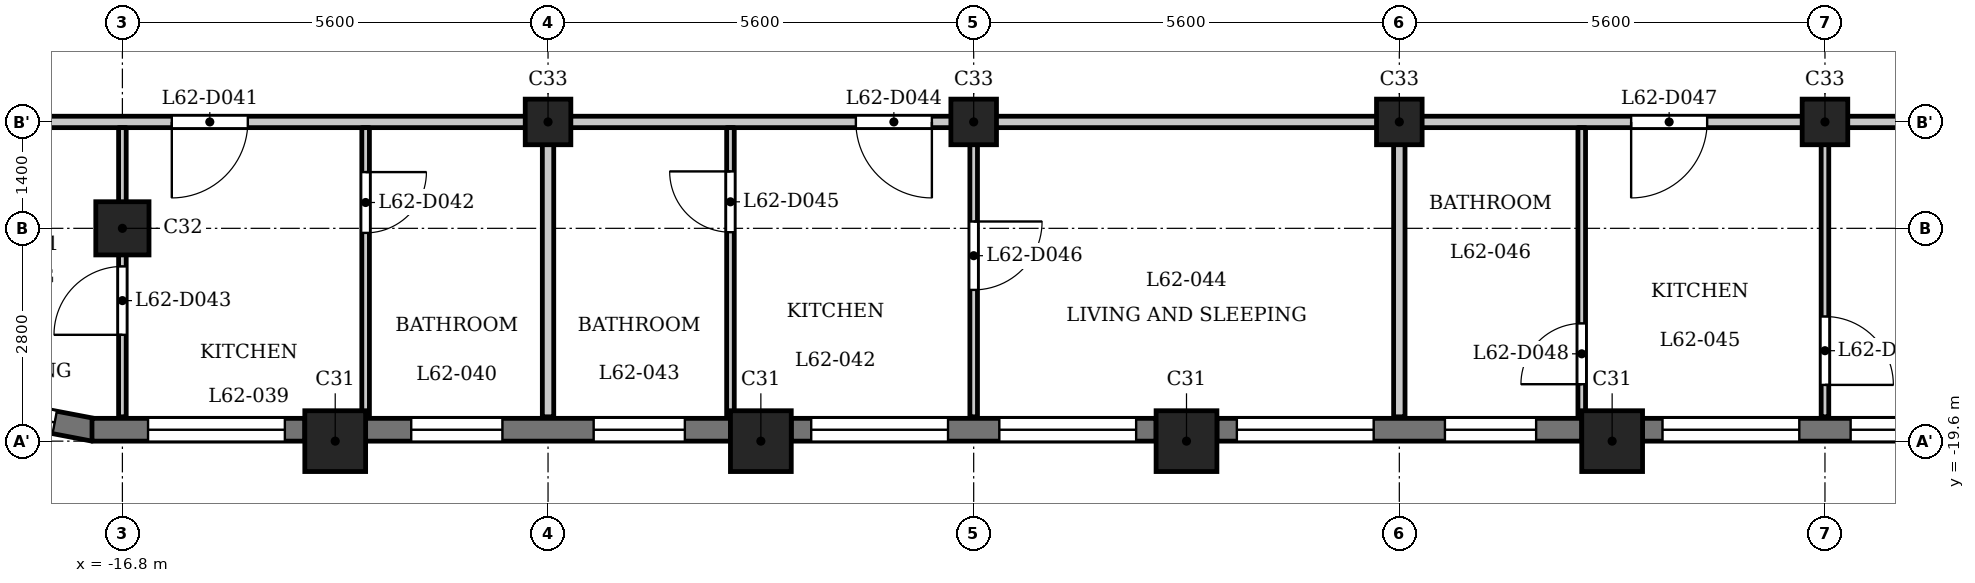
"""IFC4 building model, lengths in metres.
Left out: names, types, materials, properties, quantities, classifications, styles, units other than length and angle.
Written with IfcOpenShell. Run it as: python <this file> out.ifc"""

import sys

from ifc_helpers import new_model, si_unit, direction, frame, frame_2d, origin, origin_2d, place, context, subcontext, project, spatial, rectangle, extrude, element, fill, save


model = new_model("IFC4")
c1 = context("Model", 3, precision=1e-05, world=origin(), true_north=direction((0.0, 1.0)))
c2 = subcontext(c1, "Body", "Model", "MODEL_VIEW")
j1 = project(units=[si_unit("LENGTHUNIT", "METRE"), si_unit("PLANEANGLEUNIT", "RADIAN")], contexts=[c1])
p1 = place(None, origin())
s1 = spatial("IfcSite", under=j1, at=p1, CompositionType="ELEMENT")
p2 = place(p1, origin())
s2 = spatial("IfcBuilding", under=s1, at=p2, CompositionType="ELEMENT")
p3 = place(p2, frame((0.0, 0.0, 241.7)))
s3 = spatial("IfcBuildingStorey", under=s2, at=p3, CompositionType="ELEMENT", Elevation=241.7)
for number, where, z_axis, x_axis in (
    (1, (-14.0, -19.6, 0.0), (0.0, 0.0, 1.0), (1.0, 0.0, 0.0)),
    (2, (-8.4, -19.6, 0.0), (0.0, 0.0, 1.0), (1.0, 0.0, 0.0)),
    (3, (-2.8, -19.6, 0.0), (0.0, 0.0, 1.0), (1.0, 0.0, 0.0)),
    (4, (2.8, -19.6, 0.0), (0.0, 0.0, 1.0), (1.0, 0.0, 0.0)),
):
    element("IfcColumn", number, at=place(p3, frame(where, z_axis=z_axis, x_axis=x_axis)), inside=s3, PredefinedType="COLUMN", context=c2, shape_type="SweptSolid", body=[
        extrude(rectangle(XDim=0.8, YDim=0.8, at=origin_2d()), origin(), (0.0, 0.0, 1.0), 3.5),
    ])
p4 = place(p3, frame((-16.8, -16.8, 0.0), z_axis=(0.0, 0.0, 1.0), x_axis=(1.0, 0.0, 0.0)))
e5 = element("IfcColumn", 5, at=p4, inside=s3, PredefinedType="COLUMN", context=c2, shape_type="SweptSolid", body=[
    extrude(rectangle(XDim=0.7, YDim=0.7, at=origin_2d()), origin(), (0.0, 0.0, 1.0), 3.5),
])
for number, where, z_axis, x_axis in (
    (6, (-11.2, -15.4, 0.0), (0.0, 0.0, 1.0), (1.0, 0.0, 0.0)),
    (7, (-5.6, -15.4, 0.0), (0.0, 0.0, 1.0), (1.0, 0.0, 0.0)),
    (8, (0.0, -15.4, 0.0), (0.0, 0.0, 1.0), (1.0, 0.0, 0.0)),
    (9, (5.6, -15.4, 0.0), (0.0, 0.0, 1.0), (1.0, 0.0, 0.0)),
):
    element("IfcColumn", number, at=place(p3, frame(where, z_axis=z_axis, x_axis=x_axis)), inside=s3, PredefinedType="COLUMN", context=c2, shape_type="SweptSolid", body=[
        extrude(rectangle(XDim=0.6, YDim=0.6, at=origin_2d()), origin(), (0.0, 0.0, 1.0), 3.5),
    ])
p5 = place(p3, frame((-18.995, -19.105, 0.0), z_axis=(0.0, 0.0, 1.0), x_axis=(0.982301706131, -0.187305520826, 0.0)))
e10 = element("IfcWall", 10, at=p5, inside=s3, PredefinedType="SOLIDWALL", context=c2, shape_type="SweptSolid", body=[
    extrude(rectangle(XDim=1.856, YDim=0.3, at=frame_2d((0.928, 0.0))), origin(), (0.0, 0.0, 1.0), 2.55),
])
p6 = place(p5, frame((0.528, 0.0, 0.6)))
e11 = element("IfcOpeningElement", 11, at=p6, cuts=e10, PredefinedType="OPENING", context=c2, shape_type="SweptSolid", body=[
    extrude(rectangle(XDim=0.8, YDim=1.55, at=frame_2d((0.4, 0.775))), frame((0.0, 0.16, 0.0), z_axis=(0.0, -1.0, 0.0), x_axis=(1.0, 0.0, 0.0)), (0.0, 0.0, 1.0), 0.32),
])
p7 = place(p3, frame((-17.2, -19.45, 0.0), z_axis=(0.0, 0.0, 1.0), x_axis=(1.0, 0.0, 0.0)))
e12 = element("IfcWall", 12, at=p7, inside=s3, PredefinedType="SOLIDWALL", context=c2, shape_type="SweptSolid", body=[
    extrude(rectangle(XDim=2.8, YDim=0.3, at=frame_2d((1.4, 0.0))), origin(), (0.0, 0.0, 1.0), 2.55),
])
p8 = place(p7, frame((0.738, 0.0, 0.9)))
e13 = element("IfcOpeningElement", 13, at=p8, cuts=e12, PredefinedType="OPENING", context=c2, shape_type="SweptSolid", body=[
    extrude(rectangle(XDim=1.8, YDim=1.25, at=frame_2d((0.9, 0.625))), frame((0.0, 0.16, 0.0), z_axis=(0.0, -1.0, 0.0), x_axis=(1.0, 0.0, 0.0)), (0.0, 0.0, 1.0), 0.32),
])
p9 = place(p3, frame((-13.6, -19.45, 0.0), z_axis=(0.0, 0.0, 1.0), x_axis=(1.0, 0.0, 0.0)))
e14 = element("IfcWall", 14, at=p9, inside=s3, PredefinedType="SOLIDWALL", context=c2, shape_type="SweptSolid", body=[
    extrude(rectangle(XDim=4.8, YDim=0.3, at=frame_2d((2.4, 0.0))), origin(), (0.0, 0.0, 1.0), 2.55),
])
p10 = place(p9, frame((0.6, 0.0, 0.6)))
e15 = element("IfcOpeningElement", 15, at=p10, cuts=e14, PredefinedType="OPENING", context=c2, shape_type="SweptSolid", body=[
    extrude(rectangle(XDim=1.2, YDim=1.55, at=frame_2d((0.6, 0.775))), frame((0.0, 0.16, 0.0), z_axis=(0.0, -1.0, 0.0), x_axis=(1.0, 0.0, 0.0)), (0.0, 0.0, 1.0), 0.32),
])
p11 = place(p9, frame((3.0, 0.0, 0.6)))
e16 = element("IfcOpeningElement", 16, at=p11, cuts=e14, PredefinedType="OPENING", context=c2, shape_type="SweptSolid", body=[
    extrude(rectangle(XDim=1.2, YDim=1.55, at=frame_2d((0.6, 0.775))), frame((0.0, 0.16, 0.0), z_axis=(0.0, -1.0, 0.0), x_axis=(1.0, 0.0, 0.0)), (0.0, 0.0, 1.0), 0.32),
])
p12 = place(p3, frame((-8.0, -19.45, 0.0), z_axis=(0.0, 0.0, 1.0), x_axis=(1.0, 0.0, 0.0)))
e17 = element("IfcWall", 17, at=p12, inside=s3, PredefinedType="SOLIDWALL", context=c2, shape_type="SweptSolid", body=[
    extrude(rectangle(XDim=4.8, YDim=0.3, at=frame_2d((2.4, 0.0))), origin(), (0.0, 0.0, 1.0), 2.55),
])
p13 = place(p12, frame((0.262, 0.0, 0.9)))
e18 = element("IfcOpeningElement", 18, at=p13, cuts=e17, PredefinedType="OPENING", context=c2, shape_type="SweptSolid", body=[
    extrude(rectangle(XDim=1.8, YDim=1.25, at=frame_2d((0.9, 0.625))), frame((0.0, 0.16, 0.0), z_axis=(0.0, -1.0, 0.0), x_axis=(1.0, 0.0, 0.0)), (0.0, 0.0, 1.0), 0.32),
])
p14 = place(p12, frame((2.738, 0.0, 0.9)))
e19 = element("IfcOpeningElement", 19, at=p14, cuts=e17, PredefinedType="OPENING", context=c2, shape_type="SweptSolid", body=[
    extrude(rectangle(XDim=1.8, YDim=1.25, at=frame_2d((0.9, 0.625))), frame((0.0, 0.16, 0.0), z_axis=(0.0, -1.0, 0.0), x_axis=(1.0, 0.0, 0.0)), (0.0, 0.0, 1.0), 0.32),
])
p15 = place(p3, frame((-2.4, -19.45, 0.0), z_axis=(0.0, 0.0, 1.0), x_axis=(1.0, 0.0, 0.0)))
e20 = element("IfcWall", 20, at=p15, inside=s3, PredefinedType="SOLIDWALL", context=c2, shape_type="SweptSolid", body=[
    extrude(rectangle(XDim=4.8, YDim=0.3, at=frame_2d((2.4, 0.0))), origin(), (0.0, 0.0, 1.0), 2.55),
])
p16 = place(p15, frame((0.262, 0.0, 0.9)))
e21 = element("IfcOpeningElement", 21, at=p16, cuts=e20, PredefinedType="OPENING", context=c2, shape_type="SweptSolid", body=[
    extrude(rectangle(XDim=1.8, YDim=1.25, at=frame_2d((0.9, 0.625))), frame((0.0, 0.16, 0.0), z_axis=(0.0, -1.0, 0.0), x_axis=(1.0, 0.0, 0.0)), (0.0, 0.0, 1.0), 0.32),
])
p17 = place(p15, frame((3.0, 0.0, 0.6)))
e22 = element("IfcOpeningElement", 22, at=p17, cuts=e20, PredefinedType="OPENING", context=c2, shape_type="SweptSolid", body=[
    extrude(rectangle(XDim=1.2, YDim=1.55, at=frame_2d((0.6, 0.775))), frame((0.0, 0.16, 0.0), z_axis=(0.0, -1.0, 0.0), x_axis=(1.0, 0.0, 0.0)), (0.0, 0.0, 1.0), 0.32),
])
p18 = place(p3, frame((3.2, -19.45, 0.0), z_axis=(0.0, 0.0, 1.0), x_axis=(1.0, 0.0, 0.0)))
e23 = element("IfcWall", 23, at=p18, inside=s3, PredefinedType="SOLIDWALL", context=c2, shape_type="SweptSolid", body=[
    extrude(rectangle(XDim=4.8, YDim=0.3, at=frame_2d((2.4, 0.0))), origin(), (0.0, 0.0, 1.0), 2.55),
])
p19 = place(p18, frame((0.262, 0.0, 0.9)))
e24 = element("IfcOpeningElement", 24, at=p19, cuts=e23, PredefinedType="OPENING", context=c2, shape_type="SweptSolid", body=[
    extrude(rectangle(XDim=1.8, YDim=1.25, at=frame_2d((0.9, 0.625))), frame((0.0, 0.16, 0.0), z_axis=(0.0, -1.0, 0.0), x_axis=(1.0, 0.0, 0.0)), (0.0, 0.0, 1.0), 0.32),
])
p20 = place(p18, frame((2.738, 0.0, 0.9)))
e25 = element("IfcOpeningElement", 25, at=p20, cuts=e23, PredefinedType="OPENING", context=c2, shape_type="SweptSolid", body=[
    extrude(rectangle(XDim=1.8, YDim=1.25, at=frame_2d((0.9, 0.625))), frame((0.0, 0.16, 0.0), z_axis=(0.0, -1.0, 0.0), x_axis=(1.0, 0.0, 0.0)), (0.0, 0.0, 1.0), 0.32),
])
p21 = place(p3, frame((-23.322, -15.4, 0.0), z_axis=(0.0, 0.0, 1.0), x_axis=(1.0, 0.0, 0.0)))
e26 = element("IfcWall", 26, at=p21, inside=s3, PredefinedType="PARTITIONING", context=c2, shape_type="SweptSolid", body=[
    extrude(rectangle(XDim=46.872, YDim=0.15, at=frame_2d((23.436, 0.0))), origin(), (0.0, 0.0, 1.0), 3.2),
])
p22 = place(p21, frame((7.172, 0.0, 0.0)))
e27 = element("IfcOpeningElement", 27, at=p22, cuts=e26, PredefinedType="OPENING", context=c2, shape_type="SweptSolid", body=[
    extrude(rectangle(XDim=1.0, YDim=2.1, at=frame_2d((0.5, 1.05))), frame((0.0, 0.085, 0.0), z_axis=(0.0, -1.0, 0.0), x_axis=(1.0, 0.0, 0.0)), (0.0, 0.0, 1.0), 0.17),
])
p23 = place(p21, frame((16.172, 0.0, 0.0)))
e28 = element("IfcOpeningElement", 28, at=p23, cuts=e26, PredefinedType="OPENING", context=c2, shape_type="SweptSolid", body=[
    extrude(rectangle(XDim=1.0, YDim=2.1, at=frame_2d((0.5, 1.05))), frame((0.0, 0.085, 0.0), z_axis=(0.0, -1.0, 0.0), x_axis=(1.0, 0.0, 0.0)), (0.0, 0.0, 1.0), 0.17),
])
p24 = place(p21, frame((26.372, 0.0, 0.0)))
e29 = element("IfcOpeningElement", 29, at=p24, cuts=e26, PredefinedType="OPENING", context=c2, shape_type="SweptSolid", body=[
    extrude(rectangle(XDim=1.0, YDim=2.1, at=frame_2d((0.5, 1.05))), frame((0.0, 0.085, 0.0), z_axis=(0.0, -1.0, 0.0), x_axis=(1.0, 0.0, 0.0)), (0.0, 0.0, 1.0), 0.17),
])
p25 = place(p21, frame((38.572, 0.0, 0.0)))
e30 = element("IfcOpeningElement", 30, at=p25, cuts=e26, PredefinedType="OPENING", context=c2, shape_type="SweptSolid", body=[
    extrude(rectangle(XDim=1.0, YDim=2.1, at=frame_2d((0.5, 1.05))), frame((0.0, 0.085, 0.0), z_axis=(0.0, -1.0, 0.0), x_axis=(1.0, 0.0, 0.0)), (0.0, 0.0, 1.0), 0.17),
])
p26 = place(p3, frame((-16.8, -19.28, 0.0), z_axis=(0.0, 0.0, 1.0), x_axis=(0.0, 1.0, 0.0)))
e31 = element("IfcWall", 31, at=p26, inside=s3, PredefinedType="PARTITIONING", context=c2, shape_type="SweptSolid", body=[
    extrude(rectangle(XDim=3.805, YDim=0.1, at=frame_2d((1.902, 0.0))), origin(), (0.0, 0.0, 1.0), 3.2),
])
p27 = place(p26, frame((1.079, 0.0, 0.0)))
e32 = element("IfcOpeningElement", 32, at=p27, cuts=e31, PredefinedType="OPENING", context=c2, shape_type="SweptSolid", body=[
    extrude(rectangle(XDim=0.9, YDim=2.1, at=frame_2d((0.45, 1.05))), frame((0.0, 0.06, 0.0), z_axis=(0.0, -1.0, 0.0), x_axis=(1.0, 0.0, 0.0)), (0.0, 0.0, 1.0), 0.12),
])
p28 = place(p3, frame((-13.6, -19.28, 0.0), z_axis=(0.0, 0.0, 1.0), x_axis=(0.0, 1.0, 0.0)))
e33 = element("IfcWall", 33, at=p28, inside=s3, PredefinedType="PARTITIONING", context=c2, shape_type="SweptSolid", body=[
    extrude(rectangle(XDim=3.805, YDim=0.1, at=frame_2d((1.902, 0.0))), origin(), (0.0, 0.0, 1.0), 3.2),
])
p29 = place(p28, frame((2.42, 0.0, 0.0)))
e34 = element("IfcOpeningElement", 34, at=p29, cuts=e33, PredefinedType="OPENING", context=c2, shape_type="SweptSolid", body=[
    extrude(rectangle(XDim=0.8, YDim=2.1, at=frame_2d((0.4, 1.05))), frame((0.0, 0.06, 0.0), z_axis=(0.0, -1.0, 0.0), x_axis=(1.0, 0.0, 0.0)), (0.0, 0.0, 1.0), 0.12),
])
p30 = place(p3, frame((-11.2, -19.28, 0.0), z_axis=(0.0, 0.0, 1.0), x_axis=(0.0, 1.0, 0.0)))
e35 = element("IfcWall", 35, at=p30, inside=s3, PredefinedType="PARTITIONING", context=c2, shape_type="SweptSolid", body=[
    extrude(rectangle(XDim=3.805, YDim=0.15, at=frame_2d((1.902, 0.0))), origin(), (0.0, 0.0, 1.0), 3.2),
])
p31 = place(p3, frame((-8.8, -19.28, 0.0), z_axis=(0.0, 0.0, 1.0), x_axis=(0.0, 1.0, 0.0)))
e36 = element("IfcWall", 36, at=p31, inside=s3, PredefinedType="PARTITIONING", context=c2, shape_type="SweptSolid", body=[
    extrude(rectangle(XDim=3.805, YDim=0.1, at=frame_2d((1.902, 0.0))), origin(), (0.0, 0.0, 1.0), 3.2),
])
p32 = place(p31, frame((2.429, 0.0, 0.0)))
e37 = element("IfcOpeningElement", 37, at=p32, cuts=e36, PredefinedType="OPENING", context=c2, shape_type="SweptSolid", body=[
    extrude(rectangle(XDim=0.8, YDim=2.1, at=frame_2d((0.4, 1.05))), frame((0.0, 0.06, 0.0), z_axis=(0.0, -1.0, 0.0), x_axis=(1.0, 0.0, 0.0)), (0.0, 0.0, 1.0), 0.12),
])
p33 = place(p3, frame((-5.6, -19.28, 0.0), z_axis=(0.0, 0.0, 1.0), x_axis=(0.0, 1.0, 0.0)))
e38 = element("IfcWall", 38, at=p33, inside=s3, PredefinedType="PARTITIONING", context=c2, shape_type="SweptSolid", body=[
    extrude(rectangle(XDim=3.805, YDim=0.1, at=frame_2d((1.902, 0.0))), origin(), (0.0, 0.0, 1.0), 3.2),
])
p34 = place(p33, frame((1.67, 0.0, 0.0)))
e39 = element("IfcOpeningElement", 39, at=p34, cuts=e38, PredefinedType="OPENING", context=c2, shape_type="SweptSolid", body=[
    extrude(rectangle(XDim=0.9, YDim=2.1, at=frame_2d((0.45, 1.05))), frame((0.0, 0.06, 0.0), z_axis=(0.0, -1.0, 0.0), x_axis=(1.0, 0.0, 0.0)), (0.0, 0.0, 1.0), 0.12),
])
p35 = place(p3, frame((0.0, -19.28, 0.0), z_axis=(0.0, 0.0, 1.0), x_axis=(0.0, 1.0, 0.0)))
e40 = element("IfcWall", 40, at=p35, inside=s3, PredefinedType="PARTITIONING", context=c2, shape_type="SweptSolid", body=[
    extrude(rectangle(XDim=3.805, YDim=0.15, at=frame_2d((1.902, 0.0))), origin(), (0.0, 0.0, 1.0), 3.2),
])
p36 = place(p3, frame((2.4, -19.28, 0.0), z_axis=(0.0, 0.0, 1.0), x_axis=(0.0, 1.0, 0.0)))
e41 = element("IfcWall", 41, at=p36, inside=s3, PredefinedType="PARTITIONING", context=c2, shape_type="SweptSolid", body=[
    extrude(rectangle(XDim=3.805, YDim=0.1, at=frame_2d((1.902, 0.0))), origin(), (0.0, 0.0, 1.0), 3.2),
])
p37 = place(p36, frame((0.429, 0.0, 0.0)))
e42 = element("IfcOpeningElement", 42, at=p37, cuts=e41, PredefinedType="OPENING", context=c2, shape_type="SweptSolid", body=[
    extrude(rectangle(XDim=0.8, YDim=2.1, at=frame_2d((0.4, 1.05))), frame((0.0, 0.06, 0.0), z_axis=(0.0, -1.0, 0.0), x_axis=(1.0, 0.0, 0.0)), (0.0, 0.0, 1.0), 0.12),
])
p38 = place(p3, frame((5.6, -19.28, 0.0), z_axis=(0.0, 0.0, 1.0), x_axis=(0.0, 1.0, 0.0)))
e43 = element("IfcWall", 43, at=p38, inside=s3, PredefinedType="PARTITIONING", context=c2, shape_type="SweptSolid", body=[
    extrude(rectangle(XDim=3.805, YDim=0.1, at=frame_2d((1.902, 0.0))), origin(), (0.0, 0.0, 1.0), 3.2),
])
p39 = place(p38, frame((0.42, 0.0, 0.0)))
e44 = element("IfcOpeningElement", 44, at=p39, cuts=e43, PredefinedType="OPENING", context=c2, shape_type="SweptSolid", body=[
    extrude(rectangle(XDim=0.9, YDim=2.1, at=frame_2d((0.45, 1.05))), frame((0.0, 0.06, 0.0), z_axis=(0.0, -1.0, 0.0), x_axis=(1.0, 0.0, 0.0)), (0.0, 0.0, 1.0), 0.12),
])
p40 = place(p22, origin())
e45 = element("IfcDoor", 45, at=p40, inside=s3, OperationType="SINGLE_SWING_LEFT", PredefinedType="DOOR", context=c2, shape_type="SweptSolid", body=[
    extrude(rectangle(XDim=1.0, YDim=2.1, at=frame_2d((0.5, 1.05))), frame((0.0, 0.025, 0.0), z_axis=(0.0, -1.0, 0.0), x_axis=(1.0, 0.0, 0.0)), (0.0, 0.0, 1.0), 0.05),
])
fill(e27, e45)
p41 = place(p29, origin())
e46 = element("IfcDoor", 46, at=p41, inside=s3, OperationType="SINGLE_SWING_RIGHT", PredefinedType="DOOR", context=c2, shape_type="SweptSolid", body=[
    extrude(rectangle(XDim=0.8, YDim=2.1, at=frame_2d((0.4, 1.05))), frame((0.0, 0.025, 0.0), z_axis=(0.0, -1.0, 0.0), x_axis=(1.0, 0.0, 0.0)), (0.0, 0.0, 1.0), 0.05),
])
fill(e34, e46)
p42 = place(p27, origin())
e47 = element("IfcDoor", 47, at=p42, inside=s3, OperationType="SINGLE_SWING_RIGHT", PredefinedType="DOOR", context=c2, shape_type="SweptSolid", body=[
    extrude(rectangle(XDim=0.9, YDim=2.1, at=frame_2d((0.45, 1.05))), frame((0.0, 0.025, 0.0), z_axis=(0.0, -1.0, 0.0), x_axis=(1.0, 0.0, 0.0)), (0.0, 0.0, 1.0), 0.05),
])
fill(e32, e47)
p43 = place(p23, origin())
e48 = element("IfcDoor", 48, at=p43, inside=s3, OperationType="SINGLE_SWING_RIGHT", PredefinedType="DOOR", context=c2, shape_type="SweptSolid", body=[
    extrude(rectangle(XDim=1.0, YDim=2.1, at=frame_2d((0.5, 1.05))), frame((0.0, 0.025, 0.0), z_axis=(0.0, -1.0, 0.0), x_axis=(1.0, 0.0, 0.0)), (0.0, 0.0, 1.0), 0.05),
])
fill(e28, e48)
p44 = place(p32, origin())
e49 = element("IfcDoor", 49, at=p44, inside=s3, OperationType="SINGLE_SWING_LEFT", PredefinedType="DOOR", context=c2, shape_type="SweptSolid", body=[
    extrude(rectangle(XDim=0.8, YDim=2.1, at=frame_2d((0.4, 1.05))), frame((0.0, 0.025, 0.0), z_axis=(0.0, -1.0, 0.0), x_axis=(1.0, 0.0, 0.0)), (0.0, 0.0, 1.0), 0.05),
])
fill(e37, e49)
p45 = place(p34, origin())
e50 = element("IfcDoor", 50, at=p45, inside=s3, OperationType="SINGLE_SWING_RIGHT", PredefinedType="DOOR", context=c2, shape_type="SweptSolid", body=[
    extrude(rectangle(XDim=0.9, YDim=2.1, at=frame_2d((0.45, 1.05))), frame((0.0, 0.025, 0.0), z_axis=(0.0, -1.0, 0.0), x_axis=(1.0, 0.0, 0.0)), (0.0, 0.0, 1.0), 0.05),
])
fill(e39, e50)
p46 = place(p24, origin())
e51 = element("IfcDoor", 51, at=p46, inside=s3, OperationType="SINGLE_SWING_LEFT", PredefinedType="DOOR", context=c2, shape_type="SweptSolid", body=[
    extrude(rectangle(XDim=1.0, YDim=2.1, at=frame_2d((0.5, 1.05))), frame((0.0, 0.025, 0.0), z_axis=(0.0, -1.0, 0.0), x_axis=(1.0, 0.0, 0.0)), (0.0, 0.0, 1.0), 0.05),
])
fill(e29, e51)
p47 = place(p37, origin())
e52 = element("IfcDoor", 52, at=p47, inside=s3, OperationType="SINGLE_SWING_RIGHT", PredefinedType="DOOR", context=c2, shape_type="SweptSolid", body=[
    extrude(rectangle(XDim=0.8, YDim=2.1, at=frame_2d((0.4, 1.05))), frame((0.0, 0.025, 0.0), z_axis=(0.0, -1.0, 0.0), x_axis=(1.0, 0.0, 0.0)), (0.0, 0.0, 1.0), 0.05),
])
fill(e42, e52)
p48 = place(p39, origin())
e53 = element("IfcDoor", 53, at=p48, inside=s3, OperationType="SINGLE_SWING_LEFT", PredefinedType="DOOR", context=c2, shape_type="SweptSolid", body=[
    extrude(rectangle(XDim=0.9, YDim=2.1, at=frame_2d((0.45, 1.05))), frame((0.0, 0.025, 0.0), z_axis=(0.0, -1.0, 0.0), x_axis=(1.0, 0.0, 0.0)), (0.0, 0.0, 1.0), 0.05),
])
fill(e44, e53)
p49 = place(p6, origin())
e54 = element("IfcWindow", 54, at=p49, inside=s3, PartitioningType="SINGLE_PANEL", PredefinedType="WINDOW", context=c2, shape_type="SweptSolid", body=[
    extrude(rectangle(XDim=0.8, YDim=1.55, at=frame_2d((0.4, 0.775))), frame((0.0, 0.03, 0.0), z_axis=(0.0, -1.0, 0.0), x_axis=(1.0, 0.0, 0.0)), (0.0, 0.0, 1.0), 0.06),
])
fill(e11, e54)
p50 = place(p8, origin())
e55 = element("IfcWindow", 55, at=p50, inside=s3, PartitioningType="SINGLE_PANEL", PredefinedType="WINDOW", context=c2, shape_type="SweptSolid", body=[
    extrude(rectangle(XDim=1.8, YDim=1.25, at=frame_2d((0.9, 0.625))), frame((0.0, 0.03, 0.0), z_axis=(0.0, -1.0, 0.0), x_axis=(1.0, 0.0, 0.0)), (0.0, 0.0, 1.0), 0.06),
])
fill(e13, e55)
p51 = place(p10, origin())
e56 = element("IfcWindow", 56, at=p51, inside=s3, PartitioningType="SINGLE_PANEL", PredefinedType="WINDOW", context=c2, shape_type="SweptSolid", body=[
    extrude(rectangle(XDim=1.2, YDim=1.55, at=frame_2d((0.6, 0.775))), frame((0.0, 0.03, 0.0), z_axis=(0.0, -1.0, 0.0), x_axis=(1.0, 0.0, 0.0)), (0.0, 0.0, 1.0), 0.06),
])
fill(e15, e56)
p52 = place(p11, origin())
e57 = element("IfcWindow", 57, at=p52, inside=s3, PartitioningType="SINGLE_PANEL", PredefinedType="WINDOW", context=c2, shape_type="SweptSolid", body=[
    extrude(rectangle(XDim=1.2, YDim=1.55, at=frame_2d((0.6, 0.775))), frame((0.0, 0.03, 0.0), z_axis=(0.0, -1.0, 0.0), x_axis=(1.0, 0.0, 0.0)), (0.0, 0.0, 1.0), 0.06),
])
fill(e16, e57)
p53 = place(p13, origin())
e58 = element("IfcWindow", 58, at=p53, inside=s3, PartitioningType="SINGLE_PANEL", PredefinedType="WINDOW", context=c2, shape_type="SweptSolid", body=[
    extrude(rectangle(XDim=1.8, YDim=1.25, at=frame_2d((0.9, 0.625))), frame((0.0, 0.03, 0.0), z_axis=(0.0, -1.0, 0.0), x_axis=(1.0, 0.0, 0.0)), (0.0, 0.0, 1.0), 0.06),
])
fill(e18, e58)
p54 = place(p14, origin())
e59 = element("IfcWindow", 59, at=p54, inside=s3, PartitioningType="SINGLE_PANEL", PredefinedType="WINDOW", context=c2, shape_type="SweptSolid", body=[
    extrude(rectangle(XDim=1.8, YDim=1.25, at=frame_2d((0.9, 0.625))), frame((0.0, 0.03, 0.0), z_axis=(0.0, -1.0, 0.0), x_axis=(1.0, 0.0, 0.0)), (0.0, 0.0, 1.0), 0.06),
])
fill(e19, e59)
p55 = place(p16, origin())
e60 = element("IfcWindow", 60, at=p55, inside=s3, PartitioningType="SINGLE_PANEL", PredefinedType="WINDOW", context=c2, shape_type="SweptSolid", body=[
    extrude(rectangle(XDim=1.8, YDim=1.25, at=frame_2d((0.9, 0.625))), frame((0.0, 0.03, 0.0), z_axis=(0.0, -1.0, 0.0), x_axis=(1.0, 0.0, 0.0)), (0.0, 0.0, 1.0), 0.06),
])
fill(e21, e60)
p56 = place(p17, origin())
e61 = element("IfcWindow", 61, at=p56, inside=s3, PartitioningType="SINGLE_PANEL", PredefinedType="WINDOW", context=c2, shape_type="SweptSolid", body=[
    extrude(rectangle(XDim=1.2, YDim=1.55, at=frame_2d((0.6, 0.775))), frame((0.0, 0.03, 0.0), z_axis=(0.0, -1.0, 0.0), x_axis=(1.0, 0.0, 0.0)), (0.0, 0.0, 1.0), 0.06),
])
fill(e22, e61)
p57 = place(p19, origin())
e62 = element("IfcWindow", 62, at=p57, inside=s3, PartitioningType="SINGLE_PANEL", PredefinedType="WINDOW", context=c2, shape_type="SweptSolid", body=[
    extrude(rectangle(XDim=1.8, YDim=1.25, at=frame_2d((0.9, 0.625))), frame((0.0, 0.03, 0.0), z_axis=(0.0, -1.0, 0.0), x_axis=(1.0, 0.0, 0.0)), (0.0, 0.0, 1.0), 0.06),
])
fill(e24, e62)
p58 = place(p20, origin())
e63 = element("IfcWindow", 63, at=p58, inside=s3, PartitioningType="SINGLE_PANEL", PredefinedType="WINDOW", context=c2, shape_type="SweptSolid", body=[
    extrude(rectangle(XDim=1.8, YDim=1.25, at=frame_2d((0.9, 0.625))), frame((0.0, 0.03, 0.0), z_axis=(0.0, -1.0, 0.0), x_axis=(1.0, 0.0, 0.0)), (0.0, 0.0, 1.0), 0.06),
])
fill(e25, e63)
save(model, sys.argv[1])
